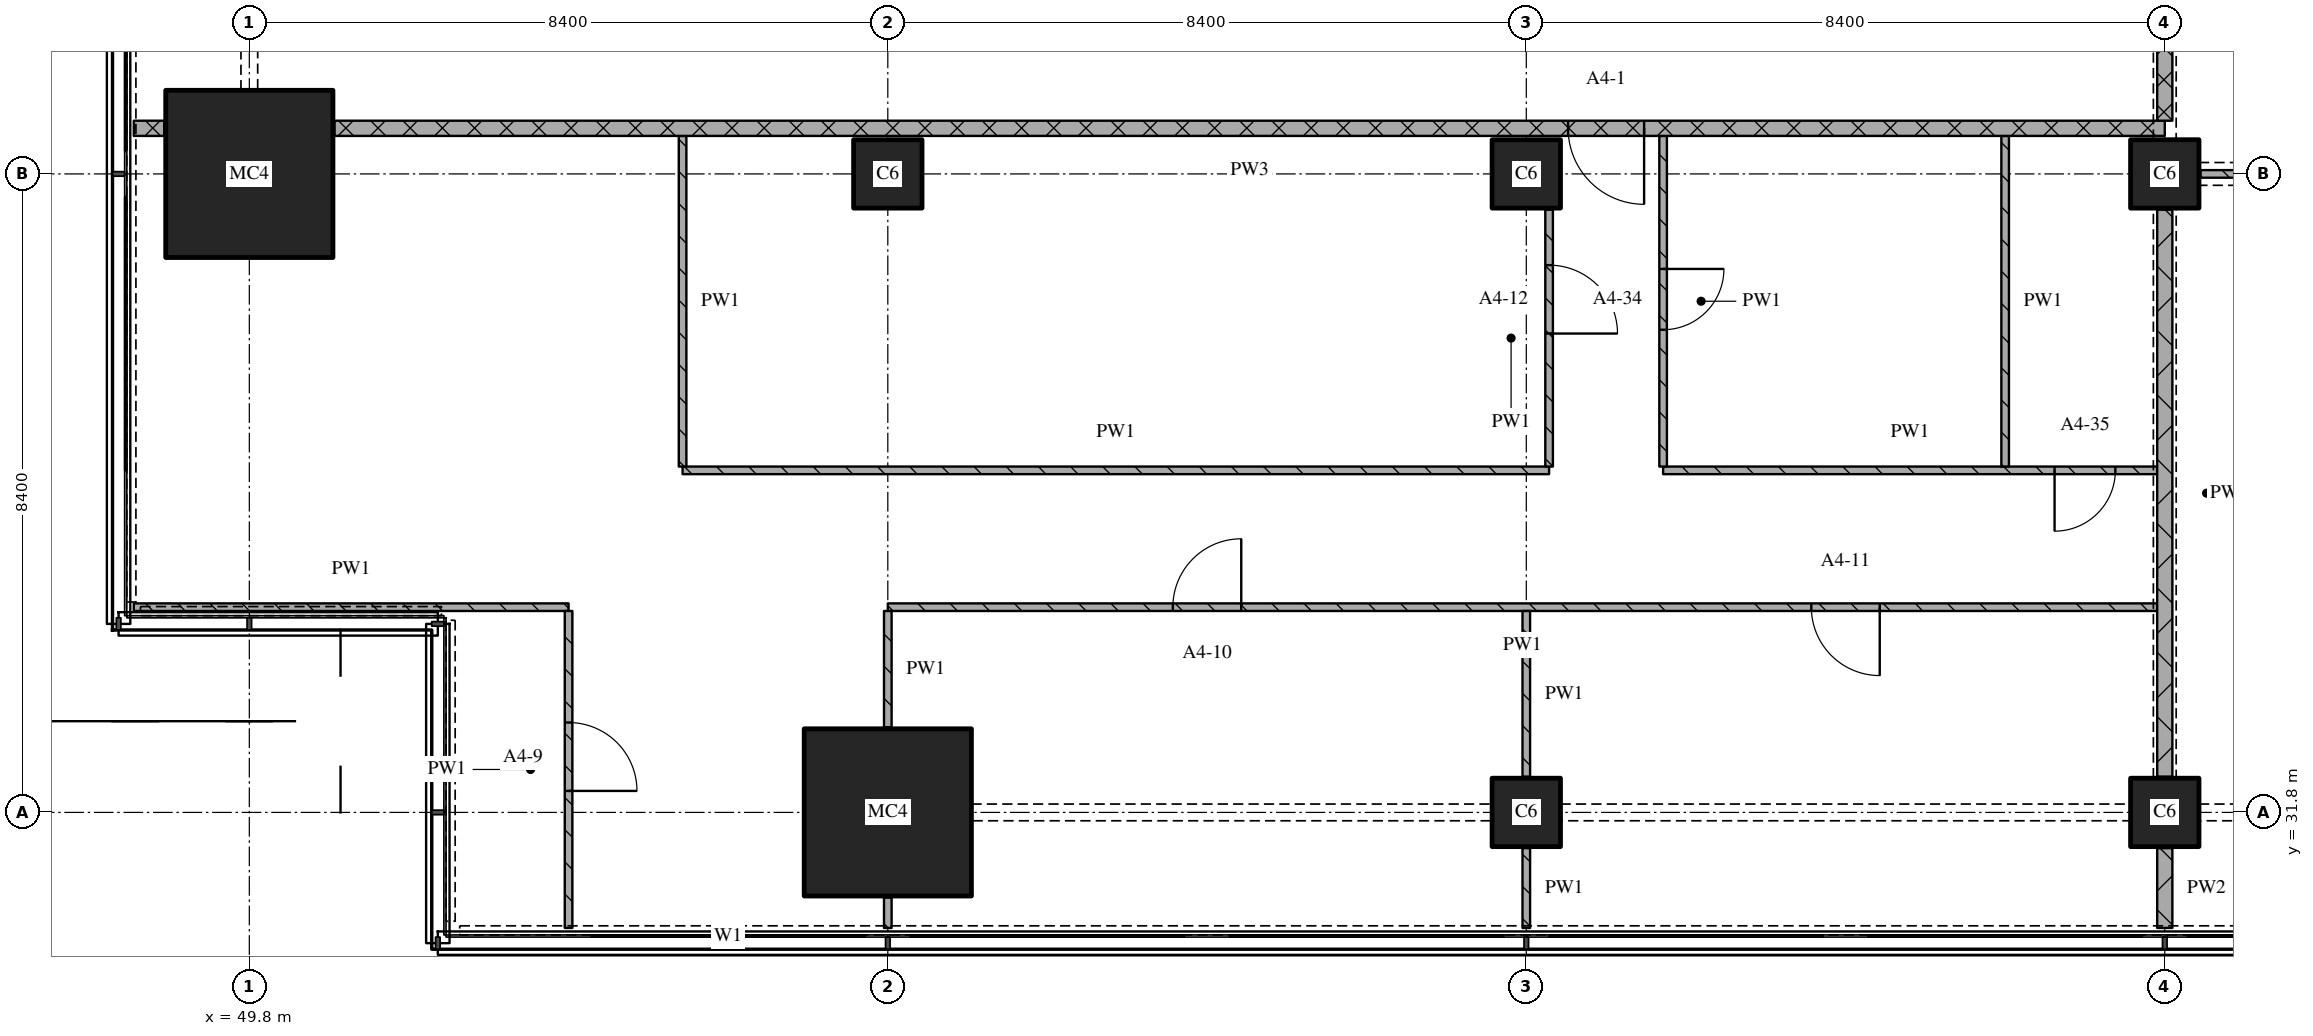
"""IFC4 building model, lengths in metres.
Left out: names, types, materials, properties, quantities, classifications, styles, units other than length and angle.
Written with IfcOpenShell. Run it as: python <this file> out.ifc"""

import sys

from ifc_helpers import new_model, si_unit, direction, frame, frame_2d, origin, origin_2d, place, context, subcontext, project, spatial, rectangle, extrude, element, fill, save


model = new_model("IFC4")
c1 = context("Model", 3, precision=1e-05, world=origin(), true_north=direction((0.0, 1.0)))
c2 = subcontext(c1, "Body", "Model", "MODEL_VIEW")
j1 = project(units=[si_unit("LENGTHUNIT", "METRE"), si_unit("PLANEANGLEUNIT", "RADIAN")], contexts=[c1])
p1 = place(None, origin())
s1 = spatial("IfcSite", under=j1, at=p1, CompositionType="ELEMENT")
p2 = place(p1, origin())
s2 = spatial("IfcBuilding", under=s1, at=p2, CompositionType="ELEMENT")
p3 = place(p2, frame((0.0, 0.0, 76.8)))
s3 = spatial("IfcBuildingStorey", under=s2, at=p3, CompositionType="ELEMENT", Elevation=76.8)
for number, where, z_axis, x_axis in (
    (1, (49.8, 40.2, 0.0), (0.0, 0.0, 1.0), (1.0, 0.0, 0.0)),
    (2, (58.2, 31.8, 0.0), (0.0, 0.0, 1.0), (1.0, 0.0, 0.0)),
):
    element("IfcColumn", number, at=place(p3, frame(where, z_axis=z_axis, x_axis=x_axis)), inside=s3, PredefinedType="COLUMN", context=c2, shape_type="SweptSolid", body=[
        extrude(rectangle(XDim=2.2, YDim=2.2, at=origin_2d()), origin(), (0.0, 0.0, 1.0), 3.6),
    ])
for number, where, z_axis, x_axis in (
    (3, (58.2, 40.2, 0.0), (0.0, 0.0, 1.0), (1.0, 0.0, 0.0)),
    (4, (66.6, 31.8, 0.0), (0.0, 0.0, 1.0), (1.0, 0.0, 0.0)),
    (5, (66.6, 40.2, 0.0), (0.0, 0.0, 1.0), (1.0, 0.0, 0.0)),
    (6, (75.0, 31.8, 0.0), (0.0, 0.0, 1.0), (1.0, 0.0, 0.0)),
    (7, (75.0, 40.2, 0.0), (0.0, 0.0, 1.0), (1.0, 0.0, 0.0)),
):
    element("IfcColumn", number, at=place(p3, frame(where, z_axis=z_axis, x_axis=x_axis)), inside=s3, PredefinedType="COLUMN", context=c2, shape_type="SweptSolid", body=[
        extrude(rectangle(XDim=0.9, YDim=0.9, at=origin_2d()), origin(), (0.0, 0.0, 1.0), 3.6),
    ])
p4 = place(p3, frame((48.28, 34.5, 0.0), z_axis=(0.0, 0.0, 1.0), x_axis=(1.0, 0.0, 0.0)))
e8 = element("IfcWall", 8, at=p4, inside=s3, PredefinedType="PARTITIONING", context=c2, shape_type="SweptSolid", body=[
    extrude(rectangle(XDim=5.72, YDim=0.1, at=frame_2d((2.86, 0.0))), origin(), (0.0, 0.0, 1.0), 3.32),
])
p5 = place(p3, frame((74.9, 34.5, 0.0), z_axis=(0.0, 0.0, 1.0), x_axis=(-1.0, 0.0, 0.0)))
e9 = element("IfcWall", 9, at=p5, inside=s3, PredefinedType="PARTITIONING", context=c2, shape_type="SweptSolid", body=[
    extrude(rectangle(XDim=16.7, YDim=0.1, at=frame_2d((8.35, 0.0))), origin(), (0.0, 0.0, 1.0), 3.32),
])
p6 = place(p5, frame((3.65, 0.0, 0.0)))
e10 = element("IfcOpeningElement", 10, at=p6, cuts=e9, PredefinedType="OPENING", context=c2, shape_type="SweptSolid", body=[
    extrude(rectangle(XDim=0.9, YDim=2.1, at=frame_2d((0.45, 1.05))), frame((0.0, 0.06, 0.0), z_axis=(0.0, -1.0, 0.0), x_axis=(1.0, 0.0, 0.0)), (0.0, 0.0, 1.0), 0.12),
])
p7 = place(p5, frame((12.05, 0.0, 0.0)))
e11 = element("IfcOpeningElement", 11, at=p7, cuts=e9, PredefinedType="OPENING", context=c2, shape_type="SweptSolid", body=[
    extrude(rectangle(XDim=0.9, YDim=2.1, at=frame_2d((0.45, 1.05))), frame((0.0, 0.06, 0.0), z_axis=(0.0, -1.0, 0.0), x_axis=(1.0, 0.0, 0.0)), (0.0, 0.0, 1.0), 0.12),
])
p8 = place(p3, frame((55.5, 36.3, 0.0), z_axis=(0.0, 0.0, 1.0), x_axis=(1.0, 0.0, 0.0)))
e12 = element("IfcWall", 12, at=p8, inside=s3, PredefinedType="PARTITIONING", context=c2, shape_type="SweptSolid", body=[
    extrude(rectangle(XDim=11.4, YDim=0.1, at=frame_2d((5.7, 0.0))), origin(), (0.0, 0.0, 1.0), 3.32),
])
p9 = place(p3, frame((68.4, 36.3, 0.0), z_axis=(0.0, 0.0, 1.0), x_axis=(1.0, 0.0, 0.0)))
e13 = element("IfcWall", 13, at=p9, inside=s3, PredefinedType="PARTITIONING", context=c2, shape_type="SweptSolid", body=[
    extrude(rectangle(XDim=6.5, YDim=0.1, at=frame_2d((3.25, 0.0))), origin(), (0.0, 0.0, 1.0), 3.32),
])
p10 = place(p9, frame((5.15, 0.0, 0.0)))
e14 = element("IfcOpeningElement", 14, at=p10, cuts=e13, PredefinedType="OPENING", context=c2, shape_type="SweptSolid", body=[
    extrude(rectangle(XDim=0.8, YDim=2.1, at=frame_2d((0.4, 1.05))), frame((0.0, 0.06, 0.0), z_axis=(0.0, -1.0, 0.0), x_axis=(1.0, 0.0, 0.0)), (0.0, 0.0, 1.0), 0.12),
])
p11 = place(p3, frame((75.47, 40.2, 0.0), z_axis=(0.0, 0.0, 1.0), x_axis=(1.0, 0.0, 0.0)))
e15 = element("IfcWall", 15, at=p11, inside=s3, PredefinedType="PARTITIONING", context=c2, shape_type="SweptSolid", body=[
    extrude(rectangle(XDim=2.23, YDim=0.1, at=frame_2d((1.115, 0.0))), origin(), (0.0, 0.0, 1.0), 2.83),
])
p12 = place(p11, frame((0.48, 0.0, 0.0)))
e16 = element("IfcOpeningElement", 16, at=p12, cuts=e15, PredefinedType="OPENING", context=c2, shape_type="SweptSolid", body=[
    extrude(rectangle(XDim=0.8, YDim=2.1, at=frame_2d((0.4, 1.05))), frame((0.0, 0.06, 0.0), z_axis=(0.0, -1.0, 0.0), x_axis=(1.0, 0.0, 0.0)), (0.0, 0.0, 1.0), 0.12),
])
p13 = place(p3, frame((48.28, 40.8, 0.0), z_axis=(0.0, 0.0, 1.0), x_axis=(1.0, 0.0, 0.0)))
e17 = element("IfcWall", 17, at=p13, inside=s3, PredefinedType="PARTITIONING", context=c2, shape_type="SweptSolid", body=[
    extrude(rectangle(XDim=0.4, YDim=0.2, at=frame_2d((0.2, 0.0))), origin(), (0.0, 0.0, 1.0), 3.32),
])
p14 = place(p3, frame((75.0, 40.8, 0.0), z_axis=(0.0, 0.0, 1.0), x_axis=(-1.0, 0.0, 0.0)))
e18 = element("IfcWall", 18, at=p14, inside=s3, PredefinedType="PARTITIONING", context=c2, shape_type="SweptSolid", body=[
    extrude(rectangle(XDim=24.08, YDim=0.2, at=frame_2d((12.04, 0.0))), origin(), (0.0, 0.0, 1.0), 3.32),
])
p15 = place(p14, frame((6.85, 0.0, 0.0)))
e19 = element("IfcOpeningElement", 19, at=p15, cuts=e18, PredefinedType="OPENING", context=c2, shape_type="SweptSolid", body=[
    extrude(rectangle(XDim=1.0, YDim=2.1, at=frame_2d((0.5, 1.05))), frame((0.0, 0.11, 0.0), z_axis=(0.0, -1.0, 0.0), x_axis=(1.0, 0.0, 0.0)), (0.0, 0.0, 1.0), 0.22),
])
p16 = place(p3, frame((54.0, 30.28, 0.0), z_axis=(0.0, 0.0, 1.0), x_axis=(0.0, 1.0, 0.0)))
e20 = element("IfcWall", 20, at=p16, inside=s3, PredefinedType="PARTITIONING", context=c2, shape_type="SweptSolid", body=[
    extrude(rectangle(XDim=4.17, YDim=0.1, at=frame_2d((2.085, 0.0))), origin(), (0.0, 0.0, 1.0), 3.32),
])
p17 = place(p16, frame((1.803, 0.0, 0.0)))
e21 = element("IfcOpeningElement", 21, at=p17, cuts=e20, PredefinedType="OPENING", context=c2, shape_type="SweptSolid", body=[
    extrude(rectangle(XDim=0.9, YDim=2.1, at=frame_2d((0.45, 1.05))), frame((0.0, 0.06, 0.0), z_axis=(0.0, -1.0, 0.0), x_axis=(1.0, 0.0, 0.0)), (0.0, 0.0, 1.0), 0.12),
])
p18 = place(p3, frame((55.5, 40.7, 0.0), z_axis=(0.0, 0.0, 1.0), x_axis=(0.0, -1.0, 0.0)))
e22 = element("IfcWall", 22, at=p18, inside=s3, PredefinedType="PARTITIONING", context=c2, shape_type="SweptSolid", body=[
    extrude(rectangle(XDim=4.35, YDim=0.1, at=frame_2d((2.175, 0.0))), origin(), (0.0, 0.0, 1.0), 3.32),
])
p19 = place(p3, frame((58.2, 30.68, 0.0), z_axis=(0.0, 0.0, 1.0), x_axis=(0.0, -1.0, 0.0)))
e23 = element("IfcWall", 23, at=p19, inside=s3, PredefinedType="PARTITIONING", context=c2, shape_type="SweptSolid", body=[
    extrude(rectangle(XDim=0.4, YDim=0.1, at=frame_2d((0.2, 0.0))), origin(), (0.0, 0.0, 1.0), 3.32),
])
p20 = place(p3, frame((58.2, 34.45, 0.0), z_axis=(0.0, 0.0, 1.0), x_axis=(0.0, -1.0, 0.0)))
e24 = element("IfcWall", 24, at=p20, inside=s3, PredefinedType="PARTITIONING", context=c2, shape_type="SweptSolid", body=[
    extrude(rectangle(XDim=1.53, YDim=0.1, at=frame_2d((0.765, 0.0))), origin(), (0.0, 0.0, 1.0), 3.32),
])
p21 = place(p3, frame((66.6, 31.33, 0.0), z_axis=(0.0, 0.0, 1.0), x_axis=(0.0, -1.0, 0.0)))
e25 = element("IfcWall", 25, at=p21, inside=s3, PredefinedType="PARTITIONING", context=c2, shape_type="SweptSolid", body=[
    extrude(rectangle(XDim=1.05, YDim=0.1, at=frame_2d((0.525, 0.0))), origin(), (0.0, 0.0, 1.0), 3.32),
])
p22 = place(p3, frame((66.6, 34.45, 0.0), z_axis=(0.0, 0.0, 1.0), x_axis=(0.0, -1.0, 0.0)))
e26 = element("IfcWall", 26, at=p22, inside=s3, PredefinedType="PARTITIONING", context=c2, shape_type="SweptSolid", body=[
    extrude(rectangle(XDim=2.18, YDim=0.1, at=frame_2d((1.09, 0.0))), origin(), (0.0, 0.0, 1.0), 3.32),
])
p23 = place(p3, frame((66.9, 36.35, 0.0), z_axis=(0.0, 0.0, 1.0), x_axis=(0.0, 1.0, 0.0)))
e27 = element("IfcWall", 27, at=p23, inside=s3, PredefinedType="PARTITIONING", context=c2, shape_type="SweptSolid", body=[
    extrude(rectangle(XDim=3.38, YDim=0.1, at=frame_2d((1.69, 0.0))), origin(), (0.0, 0.0, 1.0), 3.32),
])
p24 = place(p23, frame((1.75, 0.0, 0.0)))
e28 = element("IfcOpeningElement", 28, at=p24, cuts=e27, PredefinedType="OPENING", context=c2, shape_type="SweptSolid", body=[
    extrude(rectangle(XDim=0.9, YDim=2.1, at=frame_2d((0.45, 1.05))), frame((0.0, 0.06, 0.0), z_axis=(0.0, -1.0, 0.0), x_axis=(1.0, 0.0, 0.0)), (0.0, 0.0, 1.0), 0.12),
])
p25 = place(p3, frame((68.4, 40.7, 0.0), z_axis=(0.0, 0.0, 1.0), x_axis=(0.0, -1.0, 0.0)))
e29 = element("IfcWall", 29, at=p25, inside=s3, PredefinedType="PARTITIONING", context=c2, shape_type="SweptSolid", body=[
    extrude(rectangle(XDim=4.35, YDim=0.1, at=frame_2d((2.175, 0.0))), origin(), (0.0, 0.0, 1.0), 3.32),
])
p26 = place(p25, frame((1.75, 0.0, 0.0)))
e30 = element("IfcOpeningElement", 30, at=p26, cuts=e29, PredefinedType="OPENING", context=c2, shape_type="SweptSolid", body=[
    extrude(rectangle(XDim=0.8, YDim=2.1, at=frame_2d((0.4, 1.05))), frame((0.0, 0.06, 0.0), z_axis=(0.0, -1.0, 0.0), x_axis=(1.0, 0.0, 0.0)), (0.0, 0.0, 1.0), 0.12),
])
p27 = place(p3, frame((72.9, 40.7, 0.0), z_axis=(0.0, 0.0, 1.0), x_axis=(0.0, -1.0, 0.0)))
e31 = element("IfcWall", 31, at=p27, inside=s3, PredefinedType="PARTITIONING", context=c2, shape_type="SweptSolid", body=[
    extrude(rectangle(XDim=4.35, YDim=0.1, at=frame_2d((2.175, 0.0))), origin(), (0.0, 0.0, 1.0), 3.32),
])
p28 = place(p3, frame((75.0, 43.1, 0.0), z_axis=(0.0, 0.0, 1.0), x_axis=(0.0, -1.0, 0.0)))
e32 = element("IfcWall", 32, at=p28, inside=s3, PredefinedType="PARTITIONING", context=c2, shape_type="SweptSolid", body=[
    extrude(rectangle(XDim=2.2, YDim=0.2, at=frame_2d((1.1, 0.0))), origin(), (0.0, 0.0, 1.0), 2.43),
])
p29 = place(p3, frame((75.0, 31.33, 0.0), z_axis=(0.0, 0.0, 1.0), x_axis=(0.0, -1.0, 0.0)))
e33 = element("IfcWall", 33, at=p29, inside=s3, PredefinedType="PARTITIONING", context=c2, shape_type="SweptSolid", body=[
    extrude(rectangle(XDim=1.05, YDim=0.2, at=frame_2d((0.525, 0.0))), origin(), (0.0, 0.0, 1.0), 3.32),
])
p30 = place(p3, frame((75.0, 39.73, 0.0), z_axis=(0.0, 0.0, 1.0), x_axis=(0.0, -1.0, 0.0)))
e34 = element("IfcWall", 34, at=p30, inside=s3, PredefinedType="PARTITIONING", context=c2, shape_type="SweptSolid", body=[
    extrude(rectangle(XDim=7.46, YDim=0.2, at=frame_2d((3.73, 0.0))), origin(), (0.0, 0.0, 1.0), 2.83),
])
p31 = place(p6, origin())
e35 = element("IfcDoor", 35, at=p31, inside=s3, OperationType="SINGLE_SWING_LEFT", PredefinedType="DOOR", context=c2, shape_type="SweptSolid", body=[
    extrude(rectangle(XDim=0.9, YDim=2.1, at=frame_2d((0.45, 1.05))), frame((0.0, 0.025, 0.0), z_axis=(0.0, -1.0, 0.0), x_axis=(1.0, 0.0, 0.0)), (0.0, 0.0, 1.0), 0.05),
])
fill(e10, e35)
p32 = place(p7, origin())
e36 = element("IfcDoor", 36, at=p32, inside=s3, OperationType="SINGLE_SWING_RIGHT", PredefinedType="DOOR", context=c2, shape_type="SweptSolid", body=[
    extrude(rectangle(XDim=0.9, YDim=2.1, at=frame_2d((0.45, 1.05))), frame((0.0, 0.025, 0.0), z_axis=(0.0, -1.0, 0.0), x_axis=(1.0, 0.0, 0.0)), (0.0, 0.0, 1.0), 0.05),
])
fill(e11, e36)
p33 = place(p10, origin())
e37 = element("IfcDoor", 37, at=p33, inside=s3, OperationType="SINGLE_SWING_RIGHT", PredefinedType="DOOR", context=c2, shape_type="SweptSolid", body=[
    extrude(rectangle(XDim=0.8, YDim=2.1, at=frame_2d((0.4, 1.05))), frame((0.0, 0.025, 0.0), z_axis=(0.0, -1.0, 0.0), x_axis=(1.0, 0.0, 0.0)), (0.0, 0.0, 1.0), 0.05),
])
fill(e14, e37)
p34 = place(p15, origin())
e38 = element("IfcDoor", 38, at=p34, inside=s3, OperationType="SINGLE_SWING_LEFT", PredefinedType="DOOR", context=c2, shape_type="SweptSolid", body=[
    extrude(rectangle(XDim=1.0, YDim=2.1, at=frame_2d((0.5, 1.05))), frame((0.0, 0.025, 0.0), z_axis=(0.0, -1.0, 0.0), x_axis=(1.0, 0.0, 0.0)), (0.0, 0.0, 1.0), 0.05),
])
fill(e19, e38)
p35 = place(p17, origin())
e39 = element("IfcDoor", 39, at=p35, inside=s3, OperationType="SINGLE_SWING_RIGHT", PredefinedType="DOOR", context=c2, shape_type="SweptSolid", body=[
    extrude(rectangle(XDim=0.9, YDim=2.1, at=frame_2d((0.45, 1.05))), frame((0.0, 0.025, 0.0), z_axis=(0.0, -1.0, 0.0), x_axis=(1.0, 0.0, 0.0)), (0.0, 0.0, 1.0), 0.05),
])
fill(e21, e39)
p36 = place(p24, origin())
e40 = element("IfcDoor", 40, at=p36, inside=s3, OperationType="SINGLE_SWING_RIGHT", PredefinedType="DOOR", context=c2, shape_type="SweptSolid", body=[
    extrude(rectangle(XDim=0.9, YDim=2.1, at=frame_2d((0.45, 1.05))), frame((0.0, 0.025, 0.0), z_axis=(0.0, -1.0, 0.0), x_axis=(1.0, 0.0, 0.0)), (0.0, 0.0, 1.0), 0.05),
])
fill(e28, e40)
p37 = place(p26, origin())
e41 = element("IfcDoor", 41, at=p37, inside=s3, OperationType="SINGLE_SWING_LEFT", PredefinedType="DOOR", context=c2, shape_type="SweptSolid", body=[
    extrude(rectangle(XDim=0.8, YDim=2.1, at=frame_2d((0.4, 1.05))), frame((0.0, 0.025, 0.0), z_axis=(0.0, -1.0, 0.0), x_axis=(1.0, 0.0, 0.0)), (0.0, 0.0, 1.0), 0.05),
])
fill(e30, e41)
save(model, sys.argv[1])
